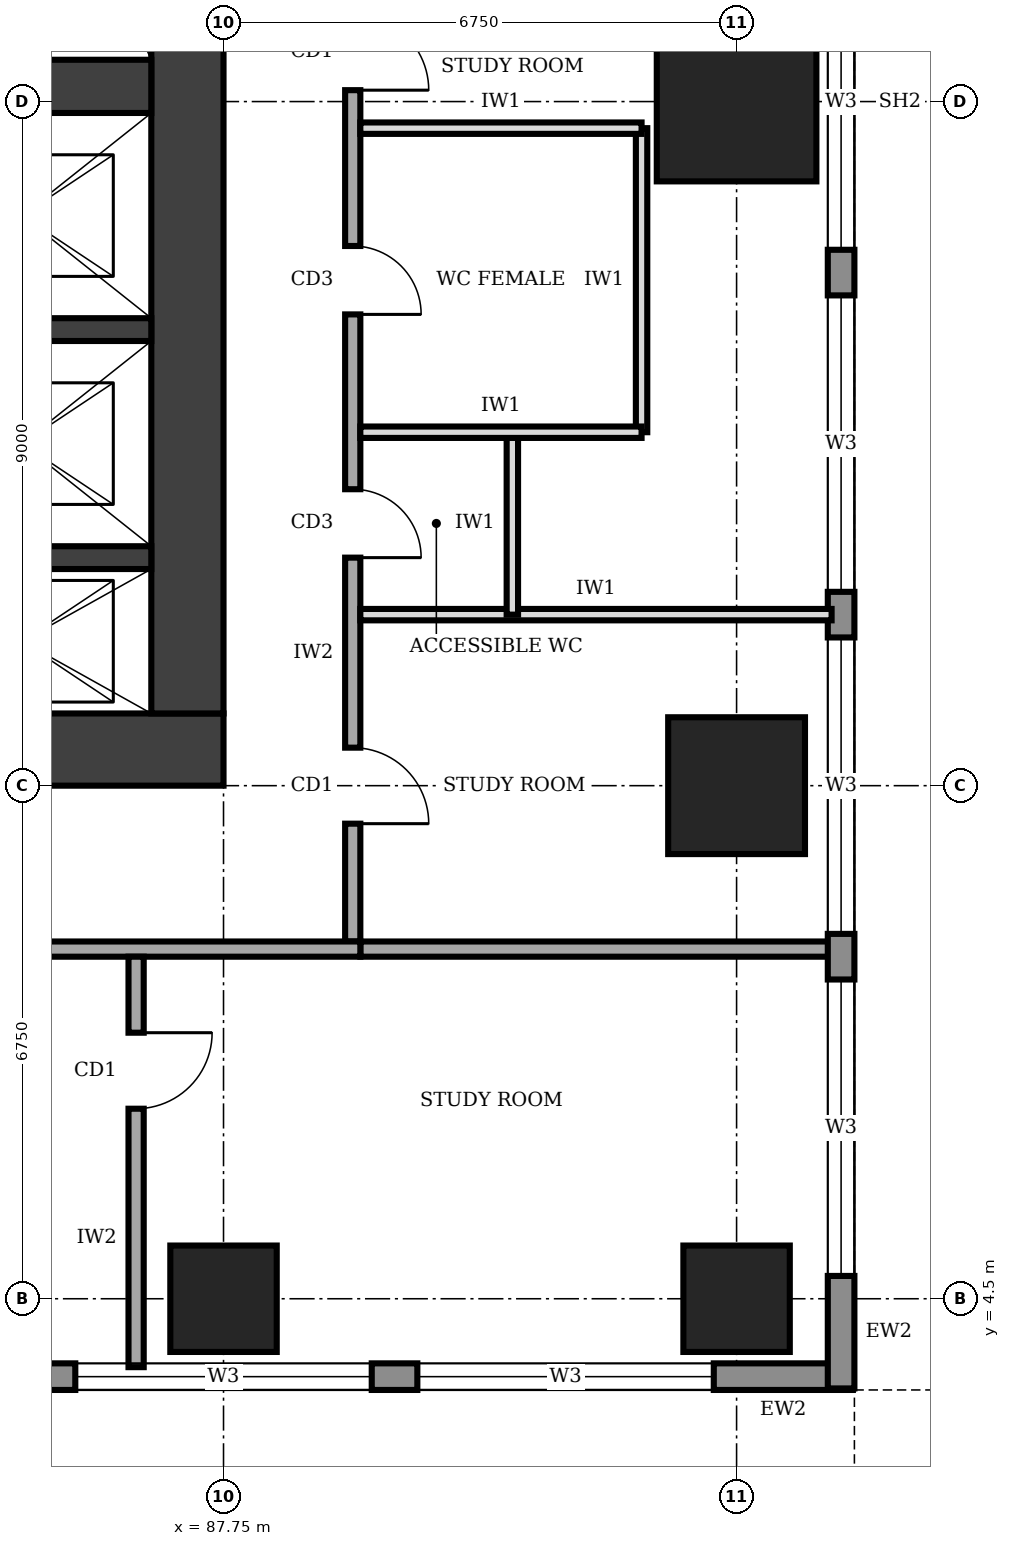
"""IFC4 building model, lengths in metres.
Left out: names, types, materials, properties, quantities, classifications, styles, units other than length and angle.
Written with IfcOpenShell. Run it as: python <this file> out.ifc"""

import sys

from ifc_helpers import new_model, si_unit, direction, frame, frame_2d, origin, origin_2d, place, context, subcontext, project, spatial, rectangle, extrude, element, fill, save


model = new_model("IFC4")
c1 = context("Model", 3, precision=1e-05, world=origin(), true_north=direction((0.0, 1.0)))
c2 = subcontext(c1, "Body", "Model", "MODEL_VIEW")
j1 = project(units=[si_unit("LENGTHUNIT", "METRE"), si_unit("PLANEANGLEUNIT", "RADIAN")], contexts=[c1])
p1 = place(None, origin())
s1 = spatial("IfcSite", under=j1, at=p1, CompositionType="ELEMENT")
p2 = place(p1, origin())
s2 = spatial("IfcBuilding", under=s1, at=p2, CompositionType="ELEMENT")
p3 = place(p2, frame((0.0, 0.0, 201.0)))
s3 = spatial("IfcBuildingStorey", under=s2, at=p3, CompositionType="ELEMENT", Elevation=201.0)
p4 = place(p3, frame((74.25, 11.725, 0.0), z_axis=(0.0, 0.0, 1.0), x_axis=(1.0, 0.0, 0.0)))
e1 = element("IfcWall", 1, at=p4, inside=s3, PredefinedType="SHEAR", context=c2, shape_type="SweptSolid", body=[
    extrude(rectangle(XDim=13.5, YDim=0.95, at=frame_2d((6.75, 0.0))), origin(), (0.0, 0.0, 1.0), 4.0),
])
p5 = place(p4, frame((4.75, 0.0, 0.0)))
e2 = element("IfcOpeningElement", 2, at=p5, cuts=e1, PredefinedType="OPENING", context=c2, shape_type="SweptSolid", body=[
    extrude(rectangle(XDim=1.0, YDim=2.1, at=frame_2d((0.5, 1.05))), frame((0.0, 0.485, 0.0), z_axis=(0.0, -1.0, 0.0), x_axis=(1.0, 0.0, 0.0)), (0.0, 0.0, 1.0), 0.97),
])
p6 = place(p3, frame((87.275, 12.2, 0.0), z_axis=(0.0, 0.0, 1.0), x_axis=(0.0, 1.0, 0.0)))
e3 = element("IfcWall", 3, at=p6, inside=s3, PredefinedType="SHEAR", context=c2, shape_type="SweptSolid", body=[
    extrude(rectangle(XDim=16.1, YDim=0.95, at=frame_2d((8.05, 0.0))), origin(), (0.0, 0.0, 1.0), 4.0),
])
for number, where, z_axis, x_axis in (
    (4, (83.4, 14.25, 0.0), (0.0, 0.0, 1.0), (1.0, 0.0, 0.0)),
    (5, (83.4, 17.25, 0.0), (0.0, 0.0, 1.0), (1.0, 0.0, 0.0)),
):
    element("IfcWall", number, at=place(p3, frame(where, z_axis=z_axis, x_axis=x_axis)), inside=s3, PredefinedType="SHEAR", context=c2, shape_type="SweptSolid", body=[
        extrude(rectangle(XDim=3.4, YDim=0.3, at=frame_2d((1.7, 0.0))), origin(), (0.0, 0.0, 1.0), 4.0),
    ])
p7 = place(p3, frame((83.4, 20.45, 0.0), z_axis=(0.0, 0.0, 1.0), x_axis=(1.0, 0.0, 0.0)))
e6 = element("IfcWall", 6, at=p7, inside=s3, PredefinedType="SHEAR", context=c2, shape_type="SweptSolid", body=[
    extrude(rectangle(XDim=3.4, YDim=0.7, at=frame_2d((1.7, 0.0))), origin(), (0.0, 0.0, 1.0), 4.0),
])
for number, where, z_axis, x_axis in (
    (7, (87.75, 4.5, 0.0), (0.0, 0.0, 1.0), (1.0, 0.0, 0.0)),
    (8, (94.5, 4.5, 0.0), (0.0, 0.0, 1.0), (1.0, 0.0, 0.0)),
):
    element("IfcColumn", number, at=place(p3, frame(where, z_axis=z_axis, x_axis=x_axis)), inside=s3, PredefinedType="COLUMN", context=c2, shape_type="SweptSolid", body=[
        extrude(rectangle(XDim=1.4, YDim=1.4, at=origin_2d()), origin(), (0.0, 0.0, 1.0), 4.0),
    ])
p8 = place(p3, frame((94.5, 11.25, 0.0), z_axis=(0.0, 0.0, 1.0), x_axis=(1.0, 0.0, 0.0)))
e9 = element("IfcColumn", 9, at=p8, inside=s3, PredefinedType="COLUMN", context=c2, shape_type="SweptSolid", body=[
    extrude(rectangle(XDim=1.8, YDim=1.8, at=origin_2d()), origin(), (0.0, 0.0, 1.0), 4.0),
])
p9 = place(p3, frame((94.5, 20.25, 0.0), z_axis=(0.0, 0.0, 1.0), x_axis=(1.0, 0.0, 0.0)))
e10 = element("IfcColumn", 10, at=p9, inside=s3, PredefinedType="COLUMN", context=c2, shape_type="SweptSolid", body=[
    extrude(rectangle(XDim=2.1, YDim=2.1, at=origin_2d()), origin(), (0.0, 0.0, 1.0), 4.0),
])
p10 = place(p3, frame((66.12, 3.475, 0.0), z_axis=(0.0, 0.0, 1.0), x_axis=(1.0, 0.0, 0.0)))
e11 = element("IfcWall", 11, at=p10, inside=s3, PredefinedType="STANDARD", context=c2, shape_type="SweptSolid", body=[
    extrude(rectangle(XDim=29.91, YDim=0.35, at=frame_2d((14.955, 0.0))), origin(), (0.0, 0.0, 1.0), 3.75),
])
p11 = place(p10, frame((1.68, 0.0, 0.95)))
e12 = element("IfcOpeningElement", 12, at=p11, cuts=e11, PredefinedType="OPENING", context=c2, shape_type="SweptSolid", body=[
    extrude(rectangle(XDim=3.9, YDim=1.8, at=frame_2d((1.95, 0.9))), frame((0.0, 0.185, 0.0), z_axis=(0.0, -1.0, 0.0), x_axis=(1.0, 0.0, 0.0)), (0.0, 0.0, 1.0), 0.37),
])
p12 = place(p10, frame((6.18, 0.0, 0.95)))
e13 = element("IfcOpeningElement", 13, at=p12, cuts=e11, PredefinedType="OPENING", context=c2, shape_type="SweptSolid", body=[
    extrude(rectangle(XDim=3.9, YDim=1.8, at=frame_2d((1.95, 0.9))), frame((0.0, 0.185, 0.0), z_axis=(0.0, -1.0, 0.0), x_axis=(1.0, 0.0, 0.0)), (0.0, 0.0, 1.0), 0.37),
])
p13 = place(p10, frame((10.68, 0.0, 0.95)))
e14 = element("IfcOpeningElement", 14, at=p13, cuts=e11, PredefinedType="OPENING", context=c2, shape_type="SweptSolid", body=[
    extrude(rectangle(XDim=3.9, YDim=1.8, at=frame_2d((1.95, 0.9))), frame((0.0, 0.185, 0.0), z_axis=(0.0, -1.0, 0.0), x_axis=(1.0, 0.0, 0.0)), (0.0, 0.0, 1.0), 0.37),
])
p14 = place(p10, frame((15.18, 0.0, 0.95)))
e15 = element("IfcOpeningElement", 15, at=p14, cuts=e11, PredefinedType="OPENING", context=c2, shape_type="SweptSolid", body=[
    extrude(rectangle(XDim=3.9, YDim=1.8, at=frame_2d((1.95, 0.9))), frame((0.0, 0.185, 0.0), z_axis=(0.0, -1.0, 0.0), x_axis=(1.0, 0.0, 0.0)), (0.0, 0.0, 1.0), 0.37),
])
p15 = place(p10, frame((19.68, 0.0, 0.95)))
e16 = element("IfcOpeningElement", 16, at=p15, cuts=e11, PredefinedType="OPENING", context=c2, shape_type="SweptSolid", body=[
    extrude(rectangle(XDim=3.9, YDim=1.8, at=frame_2d((1.95, 0.9))), frame((0.0, 0.185, 0.0), z_axis=(0.0, -1.0, 0.0), x_axis=(1.0, 0.0, 0.0)), (0.0, 0.0, 1.0), 0.37),
])
p16 = place(p10, frame((24.18, 0.0, 0.95)))
e17 = element("IfcOpeningElement", 17, at=p16, cuts=e11, PredefinedType="OPENING", context=c2, shape_type="SweptSolid", body=[
    extrude(rectangle(XDim=3.9, YDim=1.8, at=frame_2d((1.95, 0.9))), frame((0.0, 0.185, 0.0), z_axis=(0.0, -1.0, 0.0), x_axis=(1.0, 0.0, 0.0)), (0.0, 0.0, 1.0), 0.37),
])
p17 = place(p3, frame((95.875, 3.32, 0.0), z_axis=(0.0, 0.0, 1.0), x_axis=(0.0, 1.0, 0.0)))
e18 = element("IfcWall", 18, at=p17, inside=s3, PredefinedType="STANDARD", context=c2, shape_type="SweptSolid", body=[
    extrude(rectangle(XDim=33.86, YDim=0.35, at=frame_2d((16.93, 0.0))), origin(), (0.0, 0.0, 1.0), 3.75),
])
p18 = place(p17, frame((1.48, 0.0, 0.95)))
e19 = element("IfcOpeningElement", 19, at=p18, cuts=e18, PredefinedType="OPENING", context=c2, shape_type="SweptSolid", body=[
    extrude(rectangle(XDim=3.9, YDim=1.8, at=frame_2d((1.95, 0.9))), frame((0.0, 0.185, 0.0), z_axis=(0.0, -1.0, 0.0), x_axis=(1.0, 0.0, 0.0)), (0.0, 0.0, 1.0), 0.37),
])
p19 = place(p17, frame((5.98, 0.0, 0.95)))
e20 = element("IfcOpeningElement", 20, at=p19, cuts=e18, PredefinedType="OPENING", context=c2, shape_type="SweptSolid", body=[
    extrude(rectangle(XDim=3.9, YDim=1.8, at=frame_2d((1.95, 0.9))), frame((0.0, 0.185, 0.0), z_axis=(0.0, -1.0, 0.0), x_axis=(1.0, 0.0, 0.0)), (0.0, 0.0, 1.0), 0.37),
])
p20 = place(p17, frame((10.48, 0.0, 0.95)))
e21 = element("IfcOpeningElement", 21, at=p20, cuts=e18, PredefinedType="OPENING", context=c2, shape_type="SweptSolid", body=[
    extrude(rectangle(XDim=3.9, YDim=1.8, at=frame_2d((1.95, 0.9))), frame((0.0, 0.185, 0.0), z_axis=(0.0, -1.0, 0.0), x_axis=(1.0, 0.0, 0.0)), (0.0, 0.0, 1.0), 0.37),
])
p21 = place(p17, frame((14.98, 0.0, 0.95)))
e22 = element("IfcOpeningElement", 22, at=p21, cuts=e18, PredefinedType="OPENING", context=c2, shape_type="SweptSolid", body=[
    extrude(rectangle(XDim=3.9, YDim=1.8, at=frame_2d((1.95, 0.9))), frame((0.0, 0.185, 0.0), z_axis=(0.0, -1.0, 0.0), x_axis=(1.0, 0.0, 0.0)), (0.0, 0.0, 1.0), 0.37),
])
p22 = place(p17, frame((19.48, 0.0, 0.95)))
e23 = element("IfcOpeningElement", 23, at=p22, cuts=e18, PredefinedType="OPENING", context=c2, shape_type="SweptSolid", body=[
    extrude(rectangle(XDim=3.9, YDim=1.8, at=frame_2d((1.95, 0.9))), frame((0.0, 0.185, 0.0), z_axis=(0.0, -1.0, 0.0), x_axis=(1.0, 0.0, 0.0)), (0.0, 0.0, 1.0), 0.37),
])
p23 = place(p17, frame((23.98, 0.0, 0.95)))
e24 = element("IfcOpeningElement", 24, at=p23, cuts=e18, PredefinedType="OPENING", context=c2, shape_type="SweptSolid", body=[
    extrude(rectangle(XDim=3.9, YDim=1.8, at=frame_2d((1.95, 0.9))), frame((0.0, 0.185, 0.0), z_axis=(0.0, -1.0, 0.0), x_axis=(1.0, 0.0, 0.0)), (0.0, 0.0, 1.0), 0.37),
])
p24 = place(p17, frame((28.48, 0.0, 0.95)))
e25 = element("IfcOpeningElement", 25, at=p24, cuts=e18, PredefinedType="OPENING", context=c2, shape_type="SweptSolid", body=[
    extrude(rectangle(XDim=3.9, YDim=1.8, at=frame_2d((1.95, 0.9))), frame((0.0, 0.185, 0.0), z_axis=(0.0, -1.0, 0.0), x_axis=(1.0, 0.0, 0.0)), (0.0, 0.0, 1.0), 0.37),
])
p25 = place(p3, frame((72.65, 9.1, 0.0), z_axis=(0.0, 0.0, 1.0), x_axis=(1.0, 0.0, 0.0)))
e26 = element("IfcWall", 26, at=p25, inside=s3, PredefinedType="SOLIDWALL", context=c2, shape_type="SweptSolid", body=[
    extrude(rectangle(XDim=16.9, YDim=0.2, at=frame_2d((8.45, 0.0))), origin(), (0.0, 0.0, 1.0), 3.75),
])
p26 = place(p25, frame((1.325, 0.0, 0.0)))
e27 = element("IfcOpeningElement", 27, at=p26, cuts=e26, PredefinedType="OPENING", context=c2, shape_type="SweptSolid", body=[
    extrude(rectangle(XDim=1.0, YDim=2.1, at=frame_2d((0.5, 1.05))), frame((0.0, 0.11, 0.0), z_axis=(0.0, -1.0, 0.0), x_axis=(1.0, 0.0, 0.0)), (0.0, 0.0, 1.0), 0.22),
])
p27 = place(p3, frame((89.45, 9.2, 0.0), z_axis=(0.0, 0.0, 1.0), x_axis=(0.0, 1.0, 0.0)))
e28 = element("IfcWall", 28, at=p27, inside=s3, PredefinedType="SOLIDWALL", context=c2, shape_type="SweptSolid", body=[
    extrude(rectangle(XDim=22.3, YDim=0.2, at=frame_2d((11.15, 0.0))), origin(), (0.0, 0.0, 1.0), 3.75),
])
p28 = place(p27, frame((1.55, 0.0, 0.0)))
e29 = element("IfcOpeningElement", 29, at=p28, cuts=e28, PredefinedType="OPENING", context=c2, shape_type="SweptSolid", body=[
    extrude(rectangle(XDim=1.0, YDim=2.1, at=frame_2d((0.5, 1.05))), frame((0.0, 0.11, 0.0), z_axis=(0.0, -1.0, 0.0), x_axis=(1.0, 0.0, 0.0)), (0.0, 0.0, 1.0), 0.22),
])
p29 = place(p27, frame((5.05, 0.0, 0.0)))
e30 = element("IfcOpeningElement", 30, at=p29, cuts=e28, PredefinedType="OPENING", context=c2, shape_type="SweptSolid", body=[
    extrude(rectangle(XDim=0.9, YDim=2.1, at=frame_2d((0.45, 1.05))), frame((0.0, 0.11, 0.0), z_axis=(0.0, -1.0, 0.0), x_axis=(1.0, 0.0, 0.0)), (0.0, 0.0, 1.0), 0.22),
])
p30 = place(p27, frame((8.25, 0.0, 0.0)))
e31 = element("IfcOpeningElement", 31, at=p30, cuts=e28, PredefinedType="OPENING", context=c2, shape_type="SweptSolid", body=[
    extrude(rectangle(XDim=0.9, YDim=2.1, at=frame_2d((0.45, 1.05))), frame((0.0, 0.11, 0.0), z_axis=(0.0, -1.0, 0.0), x_axis=(1.0, 0.0, 0.0)), (0.0, 0.0, 1.0), 0.22),
])
p31 = place(p27, frame((13.8, 0.0, 0.0)))
e32 = element("IfcOpeningElement", 32, at=p31, cuts=e28, PredefinedType="OPENING", context=c2, shape_type="SweptSolid", body=[
    extrude(rectangle(XDim=0.9, YDim=2.1, at=frame_2d((0.45, 1.05))), frame((0.0, 0.11, 0.0), z_axis=(0.0, -1.0, 0.0), x_axis=(1.0, 0.0, 0.0)), (0.0, 0.0, 1.0), 0.22),
])
p32 = place(p27, frame((16.3, 0.0, 0.0)))
e33 = element("IfcOpeningElement", 33, at=p32, cuts=e28, PredefinedType="OPENING", context=c2, shape_type="SweptSolid", body=[
    extrude(rectangle(XDim=1.0, YDim=2.1, at=frame_2d((0.5, 1.05))), frame((0.0, 0.11, 0.0), z_axis=(0.0, -1.0, 0.0), x_axis=(1.0, 0.0, 0.0)), (0.0, 0.0, 1.0), 0.22),
])
p33 = place(p27, frame((11.2, 0.0, 0.0)))
e34 = element("IfcOpeningElement", 34, at=p33, cuts=e28, PredefinedType="OPENING", context=c2, shape_type="SweptSolid", body=[
    extrude(rectangle(XDim=1.0, YDim=2.1, at=frame_2d((0.5, 1.05))), frame((0.0, 0.11, 0.0), z_axis=(0.0, -1.0, 0.0), x_axis=(1.0, 0.0, 0.0)), (0.0, 0.0, 1.0), 0.22),
])
p34 = place(p27, frame((19.55, 0.0, 0.0)))
e35 = element("IfcOpeningElement", 35, at=p34, cuts=e28, PredefinedType="OPENING", context=c2, shape_type="SweptSolid", body=[
    extrude(rectangle(XDim=1.0, YDim=2.1, at=frame_2d((0.5, 1.05))), frame((0.0, 0.11, 0.0), z_axis=(0.0, -1.0, 0.0), x_axis=(1.0, 0.0, 0.0)), (0.0, 0.0, 1.0), 0.22),
])
p35 = place(p3, frame((86.6, 9.0, 0.0), z_axis=(0.0, 0.0, 1.0), x_axis=(0.0, -1.0, 0.0)))
e36 = element("IfcWall", 36, at=p35, inside=s3, PredefinedType="SOLIDWALL", context=c2, shape_type="SweptSolid", body=[
    extrude(rectangle(XDim=5.4, YDim=0.2, at=frame_2d((2.7, 0.0))), origin(), (0.0, 0.0, 1.0), 3.75),
])
p36 = place(p35, frame((1.0, 0.0, 0.0)))
e37 = element("IfcOpeningElement", 37, at=p36, cuts=e36, PredefinedType="OPENING", context=c2, shape_type="SweptSolid", body=[
    extrude(rectangle(XDim=1.0, YDim=2.1, at=frame_2d((0.5, 1.05))), frame((0.0, 0.11, 0.0), z_axis=(0.0, -1.0, 0.0), x_axis=(1.0, 0.0, 0.0)), (0.0, 0.0, 1.0), 0.22),
])
p37 = place(p3, frame((89.55, 9.1, 0.0), z_axis=(0.0, 0.0, 1.0), x_axis=(1.0, 0.0, 0.0)))
e38 = element("IfcWall", 38, at=p37, inside=s3, PredefinedType="SOLIDWALL", context=c2, shape_type="SweptSolid", body=[
    extrude(rectangle(XDim=6.2, YDim=0.2, at=frame_2d((3.1, 0.0))), origin(), (0.0, 0.0, 1.0), 3.75),
])
p38 = place(p3, frame((89.55, 13.5, 0.0), z_axis=(0.0, 0.0, 1.0), x_axis=(1.0, 0.0, 0.0)))
e39 = element("IfcWall", 39, at=p38, inside=s3, PredefinedType="PARTITIONING", context=c2, shape_type="SweptSolid", body=[
    extrude(rectangle(XDim=6.2, YDim=0.15, at=frame_2d((3.1, 0.0))), origin(), (0.0, 0.0, 1.0), 3.75),
])
p39 = place(p3, frame((89.55, 15.9, 0.0), z_axis=(0.0, 0.0, 1.0), x_axis=(1.0, 0.0, 0.0)))
e40 = element("IfcWall", 40, at=p39, inside=s3, PredefinedType="PARTITIONING", context=c2, shape_type="SweptSolid", body=[
    extrude(rectangle(XDim=3.7, YDim=0.15, at=frame_2d((1.85, 0.0))), origin(), (0.0, 0.0, 1.0), 3.75),
])
p40 = place(p3, frame((89.55, 19.9, 0.0), z_axis=(0.0, 0.0, 1.0), x_axis=(1.0, 0.0, 0.0)))
e41 = element("IfcWall", 41, at=p40, inside=s3, PredefinedType="PARTITIONING", context=c2, shape_type="SweptSolid", body=[
    extrude(rectangle(XDim=3.7, YDim=0.15, at=frame_2d((1.85, 0.0))), origin(), (0.0, 0.0, 1.0), 2.85),
])
p41 = place(p3, frame((91.55, 13.5, 0.0), z_axis=(0.0, 0.0, 1.0), x_axis=(0.0, 1.0, 0.0)))
e42 = element("IfcWall", 42, at=p41, inside=s3, PredefinedType="PARTITIONING", context=c2, shape_type="SweptSolid", body=[
    extrude(rectangle(XDim=2.4, YDim=0.15, at=frame_2d((1.2, 0.0))), origin(), (0.0, 0.0, 1.0), 3.75),
])
p42 = place(p3, frame((93.25, 15.9, 0.0), z_axis=(0.0, 0.0, 1.0), x_axis=(0.0, 1.0, 0.0)))
e43 = element("IfcWall", 43, at=p42, inside=s3, PredefinedType="PARTITIONING", context=c2, shape_type="SweptSolid", body=[
    extrude(rectangle(XDim=4.0, YDim=0.15, at=frame_2d((2.0, 0.0))), origin(), (0.0, 0.0, 1.0), 3.75),
])
p43 = place(p15, origin())
e44 = element("IfcWindow", 44, at=p43, inside=s3, PartitioningType="SINGLE_PANEL", PredefinedType="WINDOW", context=c2, shape_type="SweptSolid", body=[
    extrude(rectangle(XDim=3.9, YDim=1.8, at=frame_2d((1.95, 0.9))), frame((0.0, 0.03, 0.0), z_axis=(0.0, -1.0, 0.0), x_axis=(1.0, 0.0, 0.0)), (0.0, 0.0, 1.0), 0.06),
])
fill(e16, e44)
p44 = place(p16, origin())
e45 = element("IfcWindow", 45, at=p44, inside=s3, PartitioningType="SINGLE_PANEL", PredefinedType="WINDOW", context=c2, shape_type="SweptSolid", body=[
    extrude(rectangle(XDim=3.9, YDim=1.8, at=frame_2d((1.95, 0.9))), frame((0.0, 0.03, 0.0), z_axis=(0.0, -1.0, 0.0), x_axis=(1.0, 0.0, 0.0)), (0.0, 0.0, 1.0), 0.06),
])
fill(e17, e45)
p45 = place(p18, origin())
e46 = element("IfcWindow", 46, at=p45, inside=s3, PartitioningType="SINGLE_PANEL", PredefinedType="WINDOW", context=c2, shape_type="SweptSolid", body=[
    extrude(rectangle(XDim=3.9, YDim=1.8, at=frame_2d((1.95, 0.9))), frame((0.0, 0.03, 0.0), z_axis=(0.0, -1.0, 0.0), x_axis=(1.0, 0.0, 0.0)), (0.0, 0.0, 1.0), 0.06),
])
fill(e19, e46)
p46 = place(p19, origin())
e47 = element("IfcWindow", 47, at=p46, inside=s3, PartitioningType="SINGLE_PANEL", PredefinedType="WINDOW", context=c2, shape_type="SweptSolid", body=[
    extrude(rectangle(XDim=3.9, YDim=1.8, at=frame_2d((1.95, 0.9))), frame((0.0, 0.03, 0.0), z_axis=(0.0, -1.0, 0.0), x_axis=(1.0, 0.0, 0.0)), (0.0, 0.0, 1.0), 0.06),
])
fill(e20, e47)
p47 = place(p20, origin())
e48 = element("IfcWindow", 48, at=p47, inside=s3, PartitioningType="SINGLE_PANEL", PredefinedType="WINDOW", context=c2, shape_type="SweptSolid", body=[
    extrude(rectangle(XDim=3.9, YDim=1.8, at=frame_2d((1.95, 0.9))), frame((0.0, 0.03, 0.0), z_axis=(0.0, -1.0, 0.0), x_axis=(1.0, 0.0, 0.0)), (0.0, 0.0, 1.0), 0.06),
])
fill(e21, e48)
p48 = place(p21, origin())
e49 = element("IfcWindow", 49, at=p48, inside=s3, PartitioningType="SINGLE_PANEL", PredefinedType="WINDOW", context=c2, shape_type="SweptSolid", body=[
    extrude(rectangle(XDim=3.9, YDim=1.8, at=frame_2d((1.95, 0.9))), frame((0.0, 0.03, 0.0), z_axis=(0.0, -1.0, 0.0), x_axis=(1.0, 0.0, 0.0)), (0.0, 0.0, 1.0), 0.06),
])
fill(e22, e49)
p49 = place(p28, frame((1.0, 0.0, 0.0), z_axis=(0.0, 0.0, 1.0), x_axis=(-1.0, 0.0, 0.0)))
e50 = element("IfcDoor", 50, at=p49, inside=s3, OperationType="SINGLE_SWING_RIGHT", PredefinedType="DOOR", context=c2, shape_type="SweptSolid", body=[
    extrude(rectangle(XDim=1.0, YDim=2.1, at=frame_2d((0.5, 1.05))), frame((0.0, 0.025, 0.0), z_axis=(0.0, -1.0, 0.0), x_axis=(1.0, 0.0, 0.0)), (0.0, 0.0, 1.0), 0.05),
])
fill(e29, e50)
p50 = place(p29, frame((0.9, 0.0, 0.0), z_axis=(0.0, 0.0, 1.0), x_axis=(-1.0, 0.0, 0.0)))
e51 = element("IfcDoor", 51, at=p50, inside=s3, OperationType="SINGLE_SWING_RIGHT", PredefinedType="DOOR", context=c2, shape_type="SweptSolid", body=[
    extrude(rectangle(XDim=0.9, YDim=2.1, at=frame_2d((0.45, 1.05))), frame((0.0, 0.025, 0.0), z_axis=(0.0, -1.0, 0.0), x_axis=(1.0, 0.0, 0.0)), (0.0, 0.0, 1.0), 0.05),
])
fill(e30, e51)
p51 = place(p30, frame((0.9, 0.0, 0.0), z_axis=(0.0, 0.0, 1.0), x_axis=(-1.0, 0.0, 0.0)))
e52 = element("IfcDoor", 52, at=p51, inside=s3, OperationType="SINGLE_SWING_RIGHT", PredefinedType="DOOR", context=c2, shape_type="SweptSolid", body=[
    extrude(rectangle(XDim=0.9, YDim=2.1, at=frame_2d((0.45, 1.05))), frame((0.0, 0.025, 0.0), z_axis=(0.0, -1.0, 0.0), x_axis=(1.0, 0.0, 0.0)), (0.0, 0.0, 1.0), 0.05),
])
fill(e31, e52)
p52 = place(p33, frame((1.0, 0.0, 0.0), z_axis=(0.0, 0.0, 1.0), x_axis=(-1.0, 0.0, 0.0)))
e53 = element("IfcDoor", 53, at=p52, inside=s3, OperationType="SINGLE_SWING_RIGHT", PredefinedType="DOOR", context=c2, shape_type="SweptSolid", body=[
    extrude(rectangle(XDim=1.0, YDim=2.1, at=frame_2d((0.5, 1.05))), frame((0.0, 0.025, 0.0), z_axis=(0.0, -1.0, 0.0), x_axis=(1.0, 0.0, 0.0)), (0.0, 0.0, 1.0), 0.05),
])
fill(e34, e53)
p53 = place(p36, origin())
e54 = element("IfcDoor", 54, at=p53, inside=s3, OperationType="SINGLE_SWING_LEFT", PredefinedType="DOOR", context=c2, shape_type="SweptSolid", body=[
    extrude(rectangle(XDim=1.0, YDim=2.1, at=frame_2d((0.5, 1.05))), frame((0.0, 0.025, 0.0), z_axis=(0.0, -1.0, 0.0), x_axis=(1.0, 0.0, 0.0)), (0.0, 0.0, 1.0), 0.05),
])
fill(e37, e54)
save(model, sys.argv[1])
